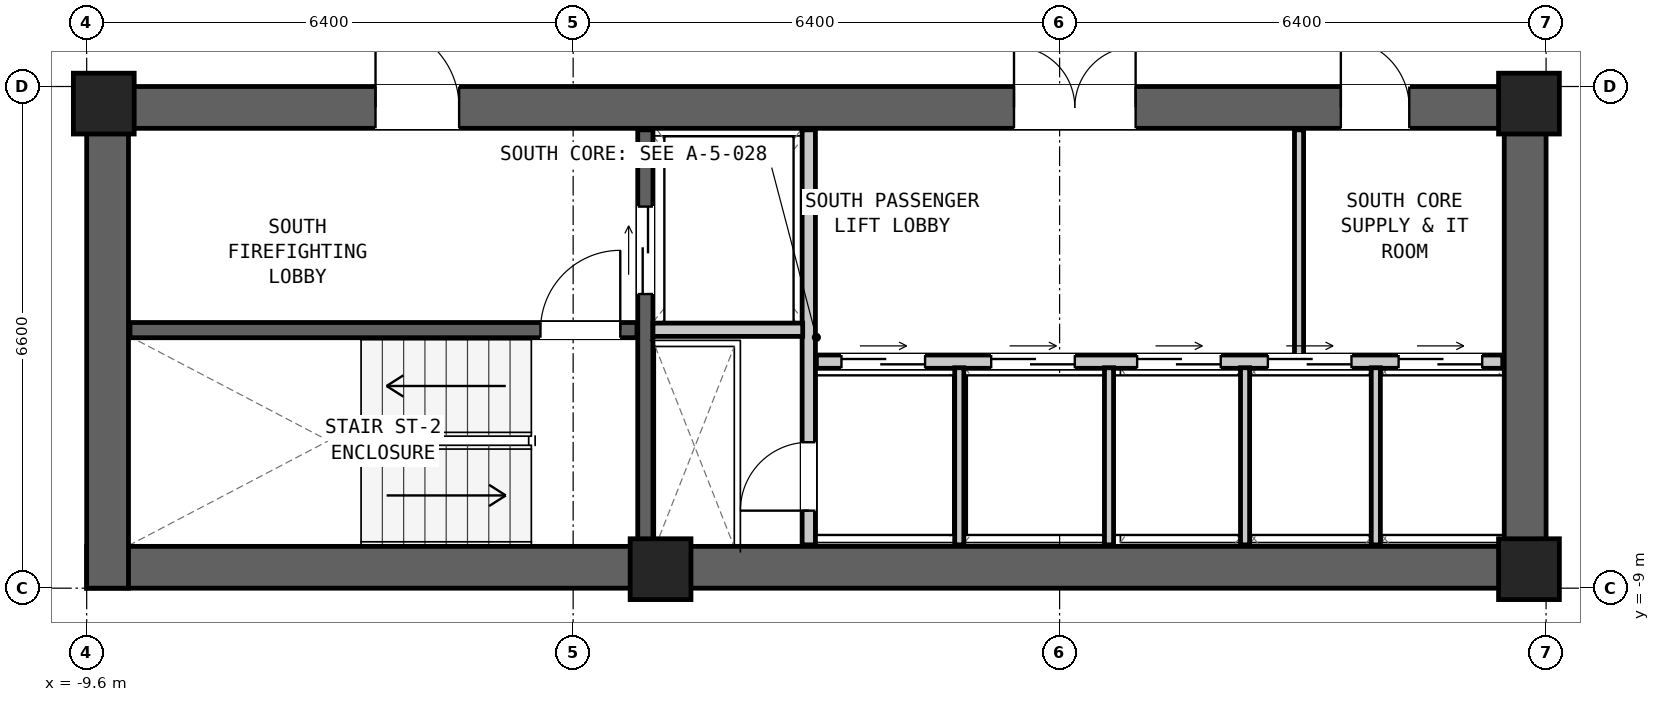
"""IFC4 building model, lengths in metres.
Left out: names, types, materials, properties, quantities, classifications, styles, units other than length and angle.
Written with IfcOpenShell. Run it as: python <this file> out.ifc"""

import sys

from ifc_helpers import new_model, si_unit, direction, frame, frame_2d, origin, origin_2d, place, context, subcontext, project, spatial, rectangle, extrude, element, fill, save


model = new_model("IFC4")
c1 = context("Model", 3, precision=1e-05, world=origin(), true_north=direction((0.0, 1.0)))
c2 = subcontext(c1, "Body", "Model", "MODEL_VIEW")
j1 = project(units=[si_unit("LENGTHUNIT", "METRE"), si_unit("PLANEANGLEUNIT", "RADIAN")], contexts=[c1])
p1 = place(None, origin())
s1 = spatial("IfcSite", under=j1, at=p1, CompositionType="ELEMENT")
p2 = place(p1, origin())
s2 = spatial("IfcBuilding", under=s1, at=p2, CompositionType="ELEMENT")
p3 = place(p2, frame((0.0, 0.0, 87.75)))
s3 = spatial("IfcBuildingStorey", under=s2, at=p3, CompositionType="ELEMENT", Elevation=87.75)
p4 = place(p3, frame((-9.6, -8.725, 0.0), z_axis=(0.0, 0.0, 1.0), x_axis=(1.0, 0.0, 0.0)))
e1 = element("IfcWall", 1, at=p4, inside=s3, PredefinedType="SHEAR", context=c2, shape_type="SweptSolid", body=[
    extrude(rectangle(XDim=19.2, YDim=0.55, at=frame_2d((9.6, 0.0))), origin(), (0.0, 0.0, 1.0), 3.05),
])
p5 = place(p3, frame((-9.6, -2.675, 0.0), z_axis=(0.0, 0.0, 1.0), x_axis=(1.0, 0.0, 0.0)))
e2 = element("IfcWall", 2, at=p5, inside=s3, PredefinedType="SHEAR", context=c2, shape_type="SweptSolid", body=[
    extrude(rectangle(XDim=19.2, YDim=0.55, at=frame_2d((9.6, 0.0))), origin(), (0.0, 0.0, 1.0), 3.05),
])
p6 = place(p5, frame((3.8, 0.0, 0.0)))
e3 = element("IfcOpeningElement", 3, at=p6, cuts=e2, PredefinedType="OPENING", context=c2, shape_type="SweptSolid", body=[
    extrude(rectangle(XDim=1.1, YDim=2.08, at=frame_2d((0.55, 1.04))), frame((0.0, 0.287, 0.0), z_axis=(0.0, -1.0, 0.0), x_axis=(1.0, 0.0, 0.0)), (0.0, 0.0, 1.0), 0.574),
])
p7 = place(p5, frame((12.2, 0.0, 0.0)))
e4 = element("IfcOpeningElement", 4, at=p7, cuts=e2, PredefinedType="OPENING", context=c2, shape_type="SweptSolid", body=[
    extrude(rectangle(XDim=1.6, YDim=2.12, at=frame_2d((0.8, 1.06))), frame((0.0, 0.287, 0.0), z_axis=(0.0, -1.0, 0.0), x_axis=(1.0, 0.0, 0.0)), (0.0, 0.0, 1.0), 0.574),
])
p8 = place(p5, frame((16.5, 0.0, 0.0)))
e5 = element("IfcOpeningElement", 5, at=p8, cuts=e2, PredefinedType="OPENING", context=c2, shape_type="SweptSolid", body=[
    extrude(rectangle(XDim=0.9, YDim=2.05, at=frame_2d((0.45, 1.025))), frame((0.0, 0.287, 0.0), z_axis=(0.0, -1.0, 0.0), x_axis=(1.0, 0.0, 0.0)), (0.0, 0.0, 1.0), 0.574),
])
for number, where, z_axis, x_axis in (
    (6, (-9.325, -9.0, 0.0), (0.0, 0.0, 1.0), (0.0, 1.0, 0.0)),
    (7, (9.325, -9.0, 0.0), (0.0, 0.0, 1.0), (0.0, 1.0, 0.0)),
):
    element("IfcWall", number, at=place(p3, frame(where, z_axis=z_axis, x_axis=x_axis)), inside=s3, PredefinedType="SHEAR", context=c2, shape_type="SweptSolid", body=[
        extrude(rectangle(XDim=6.6, YDim=0.55, at=frame_2d((3.3, 0.0))), origin(), (0.0, 0.0, 1.0), 3.05),
    ])
for number, where, z_axis, x_axis in (
    (8, (-9.375, -2.625, 0.0), (0.0, 0.0, 1.0), (1.0, 0.0, 0.0)),
    (9, (9.375, -2.625, 0.0), (0.0, 0.0, 1.0), (1.0, 0.0, 0.0)),
    (10, (-2.05, -8.75, 0.0), (0.0, 0.0, 1.0), (1.0, 0.0, 0.0)),
    (11, (9.375, -8.75, 0.0), (0.0, 0.0, 1.0), (1.0, 0.0, 0.0)),
):
    element("IfcColumn", number, at=place(p3, frame(where, z_axis=z_axis, x_axis=x_axis)), inside=s3, PredefinedType="COLUMN", context=c2, shape_type="SweptSolid", body=[
        extrude(rectangle(XDim=0.8, YDim=0.8, at=origin_2d()), origin(), (0.0, 0.0, 1.0), 3.05),
    ])
p9 = place(p3, frame((-9.03, -5.605, 0.0), z_axis=(0.0, 0.0, 1.0), x_axis=(1.0, 0.0, 0.0)))
e12 = element("IfcWall", 12, at=p9, inside=s3, PredefinedType="SHEAR", context=c2, shape_type="SweptSolid", body=[
    extrude(rectangle(XDim=6.67, YDim=0.2, at=frame_2d((3.335, 0.0))), origin(), (0.0, 0.0, 1.0), 2.83),
])
p10 = place(p9, frame((5.4, 0.0, 0.0)))
e13 = element("IfcOpeningElement", 13, at=p10, cuts=e12, PredefinedType="OPENING", context=c2, shape_type="SweptSolid", body=[
    extrude(rectangle(XDim=1.05, YDim=2.08, at=frame_2d((0.525, 1.04))), frame((0.0, 0.112, 0.0), z_axis=(0.0, -1.0, 0.0), x_axis=(1.0, 0.0, 0.0)), (0.0, 0.0, 1.0), 0.224),
])
p11 = place(p3, frame((-2.25, -8.43, 0.0), z_axis=(0.0, 0.0, 1.0), x_axis=(0.0, 1.0, 0.0)))
e14 = element("IfcWall", 14, at=p11, inside=s3, PredefinedType="SHEAR", context=c2, shape_type="SweptSolid", body=[
    extrude(rectangle(XDim=5.46, YDim=0.2, at=frame_2d((2.73, 0.0))), origin(), (0.0, 0.0, 1.0), 2.83),
])
p12 = place(p11, frame((3.3, 0.0, 0.0)))
e15 = element("IfcOpeningElement", 15, at=p12, cuts=e14, PredefinedType="OPENING", context=c2, shape_type="SweptSolid", body=[
    extrude(rectangle(XDim=1.15, YDim=2.08, at=frame_2d((0.575, 1.04))), frame((0.0, 0.112, 0.0), z_axis=(0.0, -1.0, 0.0), x_axis=(1.0, 0.0, 0.0)), (0.0, 0.0, 1.0), 0.224),
])
p13 = place(p3, frame((-0.1, -8.43, 0.0), z_axis=(0.0, 0.0, 1.0), x_axis=(0.0, 1.0, 0.0)))
e16 = element("IfcWall", 16, at=p13, inside=s3, PredefinedType="PARTITIONING", context=c2, shape_type="SweptSolid", body=[
    extrude(rectangle(XDim=5.46, YDim=0.175, at=frame_2d((2.73, 0.0))), origin(), (0.0, 0.0, 1.0), 2.83),
])
p14 = place(p13, frame((0.45, 0.0, 0.0)))
e17 = element("IfcOpeningElement", 17, at=p14, cuts=e16, PredefinedType="OPENING", context=c2, shape_type="SweptSolid", body=[
    extrude(rectangle(XDim=0.9, YDim=2.05, at=frame_2d((0.45, 1.025))), frame((0.0, 0.1, 0.0), z_axis=(0.0, -1.0, 0.0), x_axis=(1.0, 0.0, 0.0)), (0.0, 0.0, 1.0), 0.199),
])
p15 = place(p3, frame((-2.15, -5.6, 0.0), z_axis=(0.0, 0.0, 1.0), x_axis=(1.0, 0.0, 0.0)))
e18 = element("IfcWall", 18, at=p15, inside=s3, PredefinedType="PARTITIONING", context=c2, shape_type="SweptSolid", body=[
    extrude(rectangle(XDim=1.97, YDim=0.175, at=frame_2d((0.985, 0.0))), origin(), (0.0, 0.0, 1.0), 2.83),
])
p16 = place(p3, frame((0.0, -6.02, 0.0), z_axis=(0.0, 0.0, 1.0), x_axis=(1.0, 0.0, 0.0)))
e19 = element("IfcWall", 19, at=p16, inside=s3, PredefinedType="PARTITIONING", context=c2, shape_type="SweptSolid", body=[
    extrude(rectangle(XDim=9.03, YDim=0.175, at=frame_2d((4.515, 0.0))), origin(), (0.0, 0.0, 1.0), 2.83),
])
p17 = place(p16, frame((0.33, 0.0, 0.0)))
e20 = element("IfcOpeningElement", 20, at=p17, cuts=e19, PredefinedType="OPENING", context=c2, shape_type="SweptSolid", body=[
    extrude(rectangle(XDim=1.1, YDim=2.06, at=frame_2d((0.55, 1.03))), frame((0.0, 0.1, 0.0), z_axis=(0.0, -1.0, 0.0), x_axis=(1.0, 0.0, 0.0)), (0.0, 0.0, 1.0), 0.199),
])
p18 = place(p16, frame((2.3, 0.0, 0.0)))
e21 = element("IfcOpeningElement", 21, at=p18, cuts=e19, PredefinedType="OPENING", context=c2, shape_type="SweptSolid", body=[
    extrude(rectangle(XDim=1.1, YDim=2.06, at=frame_2d((0.55, 1.03))), frame((0.0, 0.1, 0.0), z_axis=(0.0, -1.0, 0.0), x_axis=(1.0, 0.0, 0.0)), (0.0, 0.0, 1.0), 0.199),
])
p19 = place(p16, frame((4.22, 0.0, 0.0)))
e22 = element("IfcOpeningElement", 22, at=p19, cuts=e19, PredefinedType="OPENING", context=c2, shape_type="SweptSolid", body=[
    extrude(rectangle(XDim=1.1, YDim=2.06, at=frame_2d((0.55, 1.03))), frame((0.0, 0.1, 0.0), z_axis=(0.0, -1.0, 0.0), x_axis=(1.0, 0.0, 0.0)), (0.0, 0.0, 1.0), 0.199),
])
p20 = place(p16, frame((5.94, 0.0, 0.0)))
e23 = element("IfcOpeningElement", 23, at=p20, cuts=e19, PredefinedType="OPENING", context=c2, shape_type="SweptSolid", body=[
    extrude(rectangle(XDim=1.1, YDim=2.06, at=frame_2d((0.55, 1.03))), frame((0.0, 0.1, 0.0), z_axis=(0.0, -1.0, 0.0), x_axis=(1.0, 0.0, 0.0)), (0.0, 0.0, 1.0), 0.199),
])
p21 = place(p16, frame((7.66, 0.0, 0.0)))
e24 = element("IfcOpeningElement", 24, at=p21, cuts=e19, PredefinedType="OPENING", context=c2, shape_type="SweptSolid", body=[
    extrude(rectangle(XDim=1.1, YDim=2.06, at=frame_2d((0.55, 1.03))), frame((0.0, 0.1, 0.0), z_axis=(0.0, -1.0, 0.0), x_axis=(1.0, 0.0, 0.0)), (0.0, 0.0, 1.0), 0.199),
])
for number, where, z_axis, x_axis in (
    (25, (1.88, -8.43, 0.0), (0.0, 0.0, 1.0), (0.0, 1.0, 0.0)),
    (26, (3.85, -8.43, 0.0), (0.0, 0.0, 1.0), (0.0, 1.0, 0.0)),
    (27, (5.64, -8.43, 0.0), (0.0, 0.0, 1.0), (0.0, 1.0, 0.0)),
    (28, (7.36, -8.43, 0.0), (0.0, 0.0, 1.0), (0.0, 1.0, 0.0)),
):
    element("IfcWall", number, at=place(p3, frame(where, z_axis=z_axis, x_axis=x_axis)), inside=s3, PredefinedType="PARTITIONING", context=c2, shape_type="SweptSolid", body=[
        extrude(rectangle(XDim=2.33, YDim=0.12, at=frame_2d((1.165, 0.0))), origin(), (0.0, 0.0, 1.0), 2.83),
    ])
p22 = place(p3, frame((6.35, -5.94, 0.0), z_axis=(0.0, 0.0, 1.0), x_axis=(0.0, 1.0, 0.0)))
e29 = element("IfcWall", 29, at=p22, inside=s3, PredefinedType="PARTITIONING", context=c2, shape_type="SweptSolid", body=[
    extrude(rectangle(XDim=2.97, YDim=0.12, at=frame_2d((1.485, 0.0))), origin(), (0.0, 0.0, 1.0), 2.83),
])
p23 = place(p10, origin())
e30 = element("IfcDoor", 30, at=p23, inside=s3, OperationType="SINGLE_SWING_RIGHT", PredefinedType="DOOR", context=c2, shape_type="SweptSolid", body=[
    extrude(rectangle(XDim=1.05, YDim=2.08, at=frame_2d((0.525, 1.04))), frame((0.0, 0.025, 0.0), z_axis=(0.0, -1.0, 0.0), x_axis=(1.0, 0.0, 0.0)), (0.0, 0.0, 1.0), 0.05),
])
fill(e13, e30)
p24 = place(p6, origin())
e31 = element("IfcDoor", 31, at=p24, inside=s3, OperationType="SINGLE_SWING_LEFT", PredefinedType="DOOR", context=c2, shape_type="SweptSolid", body=[
    extrude(rectangle(XDim=1.1, YDim=2.08, at=frame_2d((0.55, 1.04))), frame((0.0, 0.025, 0.0), z_axis=(0.0, -1.0, 0.0), x_axis=(1.0, 0.0, 0.0)), (0.0, 0.0, 1.0), 0.05),
])
fill(e3, e31)
p25 = place(p12, origin())
e32 = element("IfcDoor", 32, at=p25, inside=s3, OperationType="DOUBLE_DOOR_SLIDING", PredefinedType="DOOR", context=c2, shape_type="SweptSolid", body=[
    extrude(rectangle(XDim=1.15, YDim=2.08, at=frame_2d((0.575, 1.04))), frame((0.0, 0.025, 0.0), z_axis=(0.0, -1.0, 0.0), x_axis=(1.0, 0.0, 0.0)), (0.0, 0.0, 1.0), 0.05),
])
fill(e15, e32)
p26 = place(p14, origin())
e33 = element("IfcDoor", 33, at=p26, inside=s3, OperationType="SINGLE_SWING_LEFT", PredefinedType="DOOR", context=c2, shape_type="SweptSolid", body=[
    extrude(rectangle(XDim=0.9, YDim=2.05, at=frame_2d((0.45, 1.025))), frame((0.0, 0.025, 0.0), z_axis=(0.0, -1.0, 0.0), x_axis=(1.0, 0.0, 0.0)), (0.0, 0.0, 1.0), 0.05),
])
fill(e17, e33)
p27 = place(p7, origin())
e34 = element("IfcDoor", 34, at=p27, inside=s3, OperationType="DOUBLE_DOOR_SINGLE_SWING", PredefinedType="DOOR", context=c2, shape_type="SweptSolid", body=[
    extrude(rectangle(XDim=1.6, YDim=2.12, at=frame_2d((0.8, 1.06))), frame((0.0, 0.025, 0.0), z_axis=(0.0, -1.0, 0.0), x_axis=(1.0, 0.0, 0.0)), (0.0, 0.0, 1.0), 0.05),
])
fill(e4, e34)
p28 = place(p8, origin())
e35 = element("IfcDoor", 35, at=p28, inside=s3, OperationType="SINGLE_SWING_LEFT", PredefinedType="DOOR", context=c2, shape_type="SweptSolid", body=[
    extrude(rectangle(XDim=0.9, YDim=2.05, at=frame_2d((0.45, 1.025))), frame((0.0, 0.025, 0.0), z_axis=(0.0, -1.0, 0.0), x_axis=(1.0, 0.0, 0.0)), (0.0, 0.0, 1.0), 0.05),
])
fill(e5, e35)
p29 = place(p17, origin())
e36 = element("IfcDoor", 36, at=p29, inside=s3, OperationType="DOUBLE_DOOR_SLIDING", PredefinedType="DOOR", context=c2, shape_type="SweptSolid", body=[
    extrude(rectangle(XDim=1.1, YDim=2.06, at=frame_2d((0.55, 1.03))), frame((0.0, 0.025, 0.0), z_axis=(0.0, -1.0, 0.0), x_axis=(1.0, 0.0, 0.0)), (0.0, 0.0, 1.0), 0.05),
])
fill(e20, e36)
p30 = place(p18, origin())
e37 = element("IfcDoor", 37, at=p30, inside=s3, OperationType="DOUBLE_DOOR_SLIDING", PredefinedType="DOOR", context=c2, shape_type="SweptSolid", body=[
    extrude(rectangle(XDim=1.1, YDim=2.06, at=frame_2d((0.55, 1.03))), frame((0.0, 0.025, 0.0), z_axis=(0.0, -1.0, 0.0), x_axis=(1.0, 0.0, 0.0)), (0.0, 0.0, 1.0), 0.05),
])
fill(e21, e37)
p31 = place(p19, origin())
e38 = element("IfcDoor", 38, at=p31, inside=s3, OperationType="DOUBLE_DOOR_SLIDING", PredefinedType="DOOR", context=c2, shape_type="SweptSolid", body=[
    extrude(rectangle(XDim=1.1, YDim=2.06, at=frame_2d((0.55, 1.03))), frame((0.0, 0.025, 0.0), z_axis=(0.0, -1.0, 0.0), x_axis=(1.0, 0.0, 0.0)), (0.0, 0.0, 1.0), 0.05),
])
fill(e22, e38)
p32 = place(p20, origin())
e39 = element("IfcDoor", 39, at=p32, inside=s3, OperationType="DOUBLE_DOOR_SLIDING", PredefinedType="DOOR", context=c2, shape_type="SweptSolid", body=[
    extrude(rectangle(XDim=1.1, YDim=2.06, at=frame_2d((0.55, 1.03))), frame((0.0, 0.025, 0.0), z_axis=(0.0, -1.0, 0.0), x_axis=(1.0, 0.0, 0.0)), (0.0, 0.0, 1.0), 0.05),
])
fill(e23, e39)
p33 = place(p21, origin())
e40 = element("IfcDoor", 40, at=p33, inside=s3, OperationType="DOUBLE_DOOR_SLIDING", PredefinedType="DOOR", context=c2, shape_type="SweptSolid", body=[
    extrude(rectangle(XDim=1.1, YDim=2.06, at=frame_2d((0.55, 1.03))), frame((0.0, 0.025, 0.0), z_axis=(0.0, -1.0, 0.0), x_axis=(1.0, 0.0, 0.0)), (0.0, 0.0, 1.0), 0.05),
])
fill(e24, e40)
save(model, sys.argv[1])
